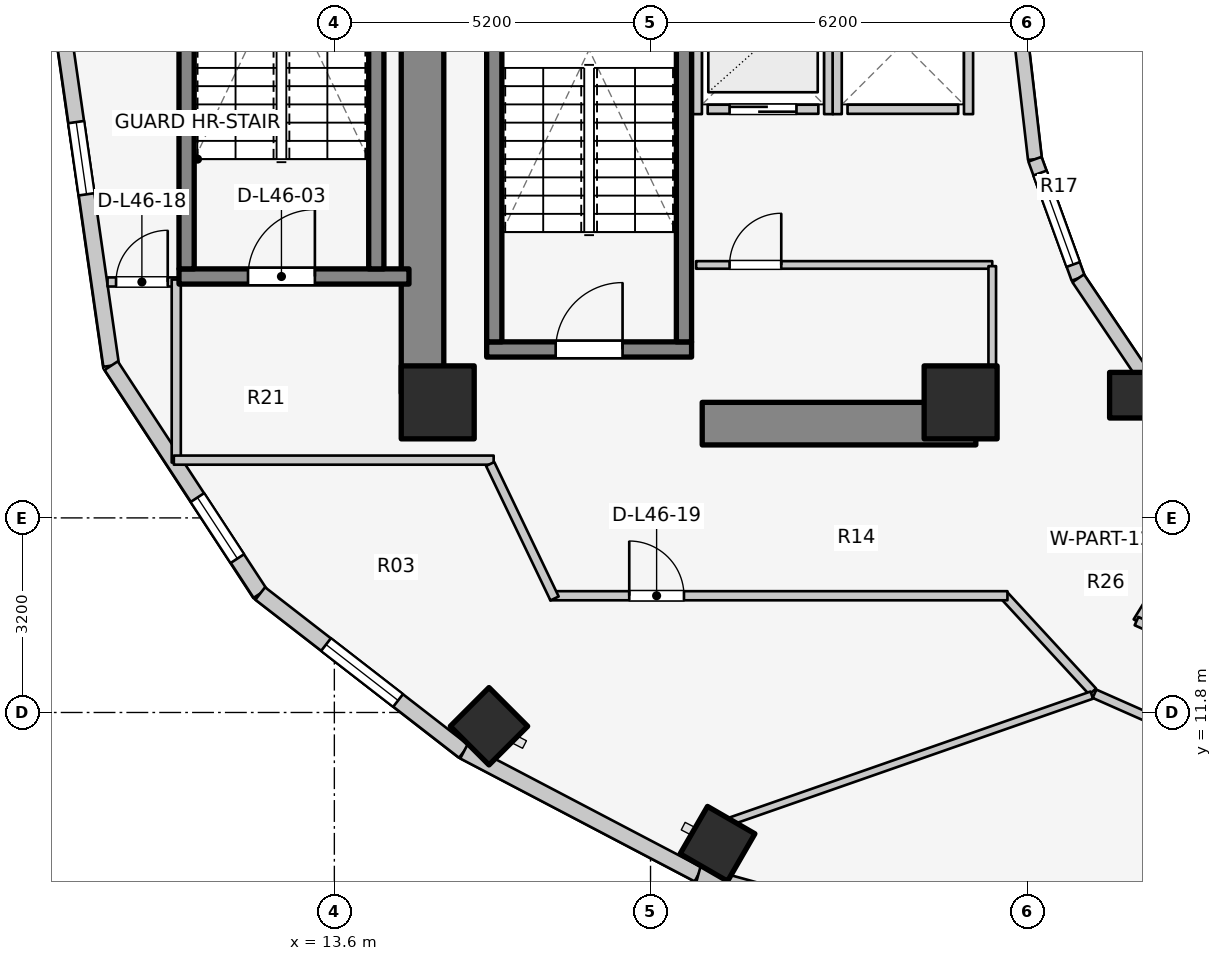
"""IFC4 building model, lengths in metres.
Left out: names, types, materials, properties, quantities, classifications, styles, units other than length and angle.
Written with IfcOpenShell. Run it as: python <this file> out.ifc"""

import sys

from ifc_helpers import new_model, si_unit, direction, frame, frame_2d, origin, origin_2d, place, context, subcontext, project, spatial, rectangle, extrude, element, fill, save


model = new_model("IFC4")
c1 = context("Model", 3, precision=1e-05, world=origin(), true_north=direction((0.0, 1.0)))
c2 = subcontext(c1, "Body", "Model", "MODEL_VIEW")
j1 = project(units=[si_unit("LENGTHUNIT", "METRE"), si_unit("PLANEANGLEUNIT", "RADIAN")], contexts=[c1])
p1 = place(None, origin())
s1 = spatial("IfcSite", under=j1, at=p1, CompositionType="ELEMENT")
p2 = place(p1, origin())
s2 = spatial("IfcBuilding", under=s1, at=p2, CompositionType="ELEMENT")
p3 = place(p2, frame((0.0, 0.0, 152.9)))
s3 = spatial("IfcBuildingStorey", under=s2, at=p3, CompositionType="ELEMENT", Elevation=152.9)
p4 = place(p3, frame((15.05, 17.05, 0.0), z_axis=(0.0, 0.0, 1.0), x_axis=(0.0, 1.0, 0.0)))
e1 = element("IfcWall", 1, at=p4, inside=s3, PredefinedType="SHEAR", context=c2, shape_type="SweptSolid", body=[
    extrude(rectangle(XDim=12.8, YDim=0.7, at=frame_2d((6.4, 0.0))), origin(), (0.0, 0.0, 1.0), 3.1),
])
p5 = place(p3, frame((19.65, 16.55, 0.0), z_axis=(0.0, 0.0, 1.0), x_axis=(1.0, 0.0, 0.0)))
e2 = element("IfcWall", 2, at=p5, inside=s3, PredefinedType="SHEAR", context=c2, shape_type="SweptSolid", body=[
    extrude(rectangle(XDim=4.5, YDim=0.7, at=frame_2d((2.25, 0.0))), origin(), (0.0, 0.0, 1.0), 3.1),
])
p6 = place(p3, frame((16.105, 17.77, 0.0), z_axis=(0.0, 0.0, 1.0), x_axis=(1.0, 0.0, 0.0)))
e3 = element("IfcWall", 3, at=p6, inside=s3, PredefinedType="SOLIDWALL", context=c2, shape_type="SweptSolid", body=[
    extrude(rectangle(XDim=3.37, YDim=0.25, at=frame_2d((1.685, 0.0))), origin(), (0.0, 0.0, 1.0), 3.1),
])
p7 = place(p6, frame((1.135, 0.0, 0.0)))
e4 = element("IfcOpeningElement", 4, at=p7, cuts=e3, PredefinedType="OPENING", context=c2, shape_type="SweptSolid", body=[
    extrude(rectangle(XDim=1.1, YDim=2.1, at=frame_2d((0.55, 1.05))), frame((0.0, 0.135, 0.0), z_axis=(0.0, -1.0, 0.0), x_axis=(1.0, 0.0, 0.0)), (0.0, 0.0, 1.0), 0.27),
])
for number, where, z_axis, x_axis in (
    (5, (16.23, 17.895, 0.0), (0.0, 0.0, 1.0), (0.0, 1.0, 0.0)),
    (6, (19.35, 17.895, 0.0), (0.0, 0.0, 1.0), (0.0, 1.0, 0.0)),
):
    element("IfcWall", number, at=place(p3, frame(where, z_axis=z_axis, x_axis=x_axis)), inside=s3, PredefinedType="SOLIDWALL", context=c2, shape_type="SweptSolid", body=[
        extrude(rectangle(XDim=7.81, YDim=0.25, at=frame_2d((3.905, 0.0))), origin(), (0.0, 0.0, 1.0), 3.1),
    ])
p8 = place(p3, frame((11.045, 18.97, 0.0), z_axis=(0.0, 0.0, 1.0), x_axis=(1.0, 0.0, 0.0)))
e7 = element("IfcWall", 7, at=p8, inside=s3, PredefinedType="SOLIDWALL", context=c2, shape_type="SweptSolid", body=[
    extrude(rectangle(XDim=3.782, YDim=0.25, at=frame_2d((1.891, 0.0))), origin(), (0.0, 0.0, 1.0), 3.1),
])
p9 = place(p8, frame((1.135, 0.0, 0.0)))
e8 = element("IfcOpeningElement", 8, at=p9, cuts=e7, PredefinedType="OPENING", context=c2, shape_type="SweptSolid", body=[
    extrude(rectangle(XDim=1.1, YDim=2.1, at=frame_2d((0.55, 1.05))), frame((0.0, 0.135, 0.0), z_axis=(0.0, -1.0, 0.0), x_axis=(1.0, 0.0, 0.0)), (0.0, 0.0, 1.0), 0.27),
])
for number, where, z_axis, x_axis in (
    (9, (11.17, 19.095, 0.0), (0.0, 0.0, 1.0), (0.0, 1.0, 0.0)),
    (10, (14.29, 19.095, 0.0), (0.0, 0.0, 1.0), (0.0, 1.0, 0.0)),
):
    element("IfcWall", number, at=place(p3, frame(where, z_axis=z_axis, x_axis=x_axis)), inside=s3, PredefinedType="SOLIDWALL", context=c2, shape_type="SweptSolid", body=[
        extrude(rectangle(XDim=7.81, YDim=0.25, at=frame_2d((3.905, 0.0))), origin(), (0.0, 0.0, 1.0), 3.1),
    ])
for number, where, z_axis, x_axis in (
    (11, (15.3, 16.9, 0.0), (0.0, 0.0, 1.0), (1.0, 0.0, 0.0)),
    (12, (23.9, 16.9, 0.0), (0.0, 0.0, 1.0), (1.0, 0.0, 0.0)),
):
    element("IfcColumn", number, at=place(p3, frame(where, z_axis=z_axis, x_axis=x_axis)), inside=s3, PredefinedType="COLUMN", context=c2, shape_type="SweptSolid", body=[
        extrude(rectangle(XDim=1.2, YDim=1.2, at=origin_2d()), origin(), (0.0, 0.0, 1.0), 3.1),
    ])
p10 = place(p3, frame((26.725, 17.018, 0.0), z_axis=(0.0, 0.0, 1.0), x_axis=(1.0, 0.0, 0.0)))
e13 = element("IfcColumn", 13, at=p10, inside=s3, PredefinedType="COLUMN", context=c2, shape_type="SweptSolid", body=[
    extrude(rectangle(XDim=0.75, YDim=0.75, at=origin_2d()), origin(), (0.0, 0.0, 1.0), 3.1),
])
for number, where, z_axis, x_axis in (
    (14, (16.143, 11.573, 0.0), (0.0, 0.0, 1.0), (-0.707, -0.707, 0.0)),
    (15, (19.902, 9.641, 0.0), (0.0, 0.0, 1.0), (-0.5, -0.866, 0.0)),
):
    element("IfcColumn", number, at=place(p3, frame(where, z_axis=z_axis, x_axis=x_axis)), inside=s3, PredefinedType="COLUMN", context=c2, shape_type="SweptSolid", body=[
        extrude(rectangle(XDim=0.9, YDim=0.9, at=origin_2d()), origin(), (0.0, 0.0, 1.0), 3.1),
    ])
p11 = place(p3, frame((24.88, 23.0, 0.0), z_axis=(0.0, 0.0, 1.0), x_axis=(0.114711713601, -0.993398823617, 0.0)))
e16 = element("IfcWall", 16, at=p11, inside=s3, PredefinedType="STANDARD", context=c2, shape_type="SweptSolid", body=[
    extrude(rectangle(XDim=2.115, YDim=0.23, at=frame_2d((1.058, 0.0))), origin(), (0.0, 0.0, 1.0), 2.84),
])
p12 = place(p3, frame((25.123, 20.898, 0.0), z_axis=(0.0, 0.0, 1.0), x_axis=(0.341423187295, -0.93990968033, 0.0)))
e17 = element("IfcWall", 17, at=p12, inside=s3, PredefinedType="STANDARD", context=c2, shape_type="SweptSolid", body=[
    extrude(rectangle(XDim=2.084, YDim=0.23, at=frame_2d((1.042, 0.0))), origin(), (0.0, 0.0, 1.0), 2.84),
])
p13 = place(p12, frame((0.242, 0.0, 0.85)))
e18 = element("IfcOpeningElement", 18, at=p13, cuts=e17, PredefinedType="OPENING", context=c2, shape_type="SweptSolid", body=[
    extrude(rectangle(XDim=1.6, YDim=1.65, at=frame_2d((0.8, 0.825))), frame((0.0, 0.125, 0.0), z_axis=(0.0, -1.0, 0.0), x_axis=(1.0, 0.0, 0.0)), (0.0, 0.0, 1.0), 0.25),
])
p14 = place(p3, frame((25.834, 18.94, 0.0), z_axis=(0.0, 0.0, 1.0), x_axis=(0.558197800898, -0.829707909492, 0.0)))
e19 = element("IfcWall", 19, at=p14, inside=s3, PredefinedType="STANDARD", context=c2, shape_type="SweptSolid", body=[
    extrude(rectangle(XDim=2.027, YDim=0.23, at=frame_2d((1.013, 0.0))), origin(), (0.0, 0.0, 1.0), 2.16),
])
p15 = place(p3, frame((9.14, 23.0, 0.0), z_axis=(0.0, 0.0, 1.0), x_axis=(0.142227632286, -0.989833976288, 0.0)))
e20 = element("IfcWall", 20, at=p15, inside=s3, PredefinedType="STANDARD", context=c2, shape_type="SweptSolid", body=[
    extrude(rectangle(XDim=5.553, YDim=0.26, at=frame_2d((2.776, 0.0))), origin(), (0.0, 0.0, 1.0), 2.85),
])
p16 = place(p15, frame((1.506, 0.0, 0.75)))
e21 = element("IfcOpeningElement", 21, at=p16, cuts=e20, PredefinedType="OPENING", context=c2, shape_type="SweptSolid", body=[
    extrude(rectangle(XDim=1.2, YDim=1.5, at=frame_2d((0.6, 0.75))), frame((0.0, 0.14, 0.0), z_axis=(0.0, -1.0, 0.0), x_axis=(1.0, 0.0, 0.0)), (0.0, 0.0, 1.0), 0.28),
])
p17 = place(p3, frame((9.93, 17.503, 0.0), z_axis=(0.0, 0.0, 1.0), x_axis=(0.547456494366, -0.836834145322, 0.0)))
e22 = element("IfcWall", 22, at=p17, inside=s3, PredefinedType="STANDARD", context=c2, shape_type="SweptSolid", body=[
    extrude(rectangle(XDim=4.477, YDim=0.26, at=frame_2d((2.239, 0.0))), origin(), (0.0, 0.0, 1.0), 2.85),
])
p18 = place(p17, frame((2.591, 0.0, 0.75)))
e23 = element("IfcOpeningElement", 23, at=p18, cuts=e22, PredefinedType="OPENING", context=c2, shape_type="SweptSolid", body=[
    extrude(rectangle(XDim=1.2, YDim=1.5, at=frame_2d((0.6, 0.75))), frame((0.0, 0.14, 0.0), z_axis=(0.0, -1.0, 0.0), x_axis=(1.0, 0.0, 0.0)), (0.0, 0.0, 1.0), 0.28),
])
p19 = place(p3, frame((12.381, 13.757, 0.0), z_axis=(0.0, 0.0, 1.0), x_axis=(0.790185650662, -0.612867552973, 0.0)))
e24 = element("IfcWall", 24, at=p19, inside=s3, PredefinedType="STANDARD", context=c2, shape_type="SweptSolid", body=[
    extrude(rectangle(XDim=4.239, YDim=0.26, at=frame_2d((2.12, 0.0))), origin(), (0.0, 0.0, 1.0), 2.85),
])
p20 = place(p19, frame((1.37, 0.0, 0.75)))
e25 = element("IfcOpeningElement", 25, at=p20, cuts=e24, PredefinedType="OPENING", context=c2, shape_type="SweptSolid", body=[
    extrude(rectangle(XDim=1.5, YDim=1.6, at=frame_2d((0.75, 0.8))), frame((0.0, 0.14, 0.0), z_axis=(0.0, -1.0, 0.0), x_axis=(1.0, 0.0, 0.0)), (0.0, 0.0, 1.0), 0.28),
])
p21 = place(p3, frame((15.731, 11.158, 0.0), z_axis=(0.0, 0.0, 1.0), x_axis=(0.885660265226, -0.464333818065, 0.0)))
e26 = element("IfcWall", 26, at=p21, inside=s3, PredefinedType="STANDARD", context=c2, shape_type="SweptSolid", body=[
    extrude(rectangle(XDim=4.354, YDim=0.26, at=frame_2d((2.177, 0.0))), origin(), (0.0, 0.0, 1.0), 2.85),
])
p22 = place(p3, frame((19.587, 9.137, 0.0), z_axis=(0.0, 0.0, 1.0), x_axis=(0.963953455704, -0.26607092144, 0.0)))
e27 = element("IfcWall", 27, at=p22, inside=s3, PredefinedType="STANDARD", context=c2, shape_type="SweptSolid", body=[
    extrude(rectangle(XDim=5.237, YDim=0.26, at=frame_2d((2.618, 0.0))), origin(), (0.0, 0.0, 1.0), 2.85),
])
p23 = place(p22, frame((1.868, 0.0, 0.75)))
e28 = element("IfcOpeningElement", 28, at=p23, cuts=e27, PredefinedType="OPENING", context=c2, shape_type="SweptSolid", body=[
    extrude(rectangle(XDim=1.5, YDim=1.6, at=frame_2d((0.75, 0.8))), frame((0.0, 0.14, 0.0), z_axis=(0.0, -1.0, 0.0), x_axis=(1.0, 0.0, 0.0)), (0.0, 0.0, 1.0), 0.28),
])
p24 = place(p3, frame((19.74, 21.72, 0.0), z_axis=(0.0, 0.0, 1.0), x_axis=(1.0, 0.0, 0.0)))
e29 = element("IfcWall", 29, at=p24, inside=s3, PredefinedType="SOLIDWALL", context=c2, shape_type="SweptSolid", body=[
    extrude(rectangle(XDim=1.82, YDim=0.15, at=frame_2d((0.91, 0.0))), origin(), (0.0, 0.0, 1.0), 2.855),
])
p25 = place(p24, frame((0.36, 0.0, 0.0)))
e30 = element("IfcOpeningElement", 30, at=p25, cuts=e29, PredefinedType="OPENING", context=c2, shape_type="SweptSolid", body=[
    extrude(rectangle(XDim=1.1, YDim=2.1, at=frame_2d((0.55, 1.05))), frame((0.0, 0.085, 0.0), z_axis=(0.0, -1.0, 0.0), x_axis=(1.0, 0.0, 0.0)), (0.0, 0.0, 1.0), 0.17),
])
for number, where, z_axis, x_axis in (
    (31, (19.57, 21.64, 0.0), (0.0, 0.0, 1.0), (0.0, 1.0, 0.0)),
    (32, (21.73, 21.64, 0.0), (0.0, 0.0, 1.0), (0.0, 1.0, 0.0)),
):
    element("IfcWall", number, at=place(p3, frame(where, z_axis=z_axis, x_axis=x_axis)), inside=s3, PredefinedType="SOLIDWALL", context=c2, shape_type="SweptSolid", body=[
        extrude(rectangle(XDim=2.32, YDim=0.15, at=frame_2d((1.16, 0.0))), origin(), (0.0, 0.0, 1.0), 2.855),
    ])
p26 = place(p3, frame((22.04, 21.72, 0.0), z_axis=(0.0, 0.0, 1.0), x_axis=(1.0, 0.0, 0.0)))
e33 = element("IfcWall", 33, at=p26, inside=s3, PredefinedType="SOLIDWALL", context=c2, shape_type="SweptSolid", body=[
    extrude(rectangle(XDim=1.82, YDim=0.15, at=frame_2d((0.91, 0.0))), origin(), (0.0, 0.0, 1.0), 2.12),
])
p27 = place(p3, frame((21.87, 21.64, 0.0), z_axis=(0.0, 0.0, 1.0), x_axis=(0.0, 1.0, 0.0)))
e34 = element("IfcWall", 34, at=p27, inside=s3, PredefinedType="SOLIDWALL", context=c2, shape_type="SweptSolid", body=[
    extrude(rectangle(XDim=2.32, YDim=0.15, at=frame_2d((1.16, 0.0))), origin(), (0.0, 0.0, 1.0), 2.855),
])
p28 = place(p3, frame((24.03, 21.64, 0.0), z_axis=(0.0, 0.0, 1.0), x_axis=(0.0, 1.0, 0.0)))
e35 = element("IfcWall", 35, at=p28, inside=s3, PredefinedType="SOLIDWALL", context=c2, shape_type="SweptSolid", body=[
    extrude(rectangle(XDim=2.32, YDim=0.15, at=frame_2d((1.16, 0.0))), origin(), (0.0, 0.0, 1.0), 2.12),
])
p29 = place(p3, frame((19.55, 19.16, 0.0), z_axis=(0.0, 0.0, 1.0), x_axis=(1.0, 0.0, 0.0)))
e36 = element("IfcWall", 36, at=p29, inside=s3, PredefinedType="PARTITIONING", context=c2, shape_type="SweptSolid", body=[
    extrude(rectangle(XDim=4.87, YDim=0.125, at=frame_2d((2.435, 0.0))), origin(), (0.0, 0.0, 1.0), 2.12),
])
p30 = place(p29, frame((0.55, 0.0, 0.0)))
e37 = element("IfcOpeningElement", 37, at=p30, cuts=e36, PredefinedType="OPENING", context=c2, shape_type="SweptSolid", body=[
    extrude(rectangle(XDim=0.85, YDim=2.05, at=frame_2d((0.425, 1.025))), frame((0.0, 0.073, 0.0), z_axis=(0.0, -1.0, 0.0), x_axis=(1.0, 0.0, 0.0)), (0.0, 0.0, 1.0), 0.145),
])
p31 = place(p3, frame((24.42, 17.1, 0.0), z_axis=(0.0, 0.0, 1.0), x_axis=(0.0, 1.0, 0.0)))
e38 = element("IfcWall", 38, at=p31, inside=s3, PredefinedType="PARTITIONING", context=c2, shape_type="SweptSolid", body=[
    extrude(rectangle(XDim=2.04, YDim=0.125, at=frame_2d((1.02, 0.0))), origin(), (0.0, 0.0, 1.0), 2.232),
])
p32 = place(p3, frame((9.87, 18.88, 0.0), z_axis=(0.0, 0.0, 1.0), x_axis=(1.0, 0.0, 0.0)))
e39 = element("IfcWall", 39, at=p32, inside=s3, PredefinedType="PARTITIONING", context=c2, shape_type="SweptSolid", body=[
    extrude(rectangle(XDim=1.17, YDim=0.15, at=frame_2d((0.585, 0.0))), origin(), (0.0, 0.0, 1.0), 2.855),
])
p33 = place(p32, frame((0.14, 0.0, 0.0)))
e40 = element("IfcOpeningElement", 40, at=p33, cuts=e39, PredefinedType="OPENING", context=c2, shape_type="SweptSolid", body=[
    extrude(rectangle(XDim=0.85, YDim=2.05, at=frame_2d((0.425, 1.025))), frame((0.0, 0.085, 0.0), z_axis=(0.0, -1.0, 0.0), x_axis=(1.0, 0.0, 0.0)), (0.0, 0.0, 1.0), 0.17),
])
p34 = place(p3, frame((11.0, 15.91, 0.0), z_axis=(0.0, 0.0, 1.0), x_axis=(0.0, 1.0, 0.0)))
e41 = element("IfcWall", 41, at=p34, inside=s3, PredefinedType="PARTITIONING", context=c2, shape_type="SweptSolid", body=[
    extrude(rectangle(XDim=3.01, YDim=0.15, at=frame_2d((1.505, 0.0))), origin(), (0.0, 0.0, 1.0), 2.855),
])
p35 = place(p3, frame((10.96, 15.95, 0.0), z_axis=(0.0, 0.0, 1.0), x_axis=(1.0, 0.0, 0.0)))
e42 = element("IfcWall", 42, at=p35, inside=s3, PredefinedType="PARTITIONING", context=c2, shape_type="SweptSolid", body=[
    extrude(rectangle(XDim=5.26, YDim=0.15, at=frame_2d((2.63, 0.0))), origin(), (0.0, 0.0, 1.0), 2.22),
])
p36 = place(p3, frame((26.072, 12.144, 0.0), z_axis=(0.0, 0.0, 1.0), x_axis=(-0.677579737957, 0.735449317567, 0.0)))
e43 = element("IfcWall", 43, at=p36, inside=s3, PredefinedType="PARTITIONING", context=c2, shape_type="SweptSolid", body=[
    extrude(rectangle(XDim=2.173, YDim=0.15, at=frame_2d((1.086, 0.0))), origin(), (0.0, 0.0, 1.0), 2.299),
])
p37 = place(p3, frame((17.15, 13.72, 0.0), z_axis=(0.0, 0.0, 1.0), x_axis=(1.0, 0.0, 0.0)))
e44 = element("IfcWall", 44, at=p37, inside=s3, PredefinedType="PARTITIONING", context=c2, shape_type="SweptSolid", body=[
    extrude(rectangle(XDim=7.52, YDim=0.15, at=frame_2d((3.76, 0.0))), origin(), (0.0, 0.0, 1.0), 2.299),
])
p38 = place(p37, frame((1.3, 0.0, 0.0)))
e45 = element("IfcOpeningElement", 45, at=p38, cuts=e44, PredefinedType="OPENING", context=c2, shape_type="SweptSolid", body=[
    extrude(rectangle(XDim=0.9, YDim=2.1, at=frame_2d((0.45, 1.05))), frame((0.0, 0.085, 0.0), z_axis=(0.0, -1.0, 0.0), x_axis=(1.0, 0.0, 0.0)), (0.0, 0.0, 1.0), 0.17),
])
p39 = place(p3, frame((17.222, 13.675, 0.0), z_axis=(0.0, 0.0, 1.0), x_axis=(-0.431973389813, 0.901886351207, 0.0)))
e46 = element("IfcWall", 46, at=p39, inside=s3, PredefinedType="PARTITIONING", context=c2, shape_type="SweptSolid", body=[
    extrude(rectangle(XDim=2.452, YDim=0.15, at=frame_2d((1.226, 0.0))), origin(), (0.0, 0.0, 1.0), 2.855),
])
p40 = place(p3, frame((28.45, 15.985, 0.0), z_axis=(0.0, 0.0, 1.0), x_axis=(-0.523587550846, -0.851971875474, 0.0)))
e47 = element("IfcWall", 47, at=p40, inside=s3, PredefinedType="PARTITIONING", context=c2, shape_type="SweptSolid", body=[
    extrude(rectangle(XDim=3.153, YDim=0.125, at=frame_2d((1.577, 0.0))), origin(), (0.0, 0.0, 1.0), 2.299),
])
p41 = place(p3, frame((26.793, 13.303, 0.0), z_axis=(0.0, 0.0, 1.0), x_axis=(0.913145536541, -0.407633694749, 0.0)))
e48 = element("IfcWall", 48, at=p41, inside=s3, PredefinedType="PARTITIONING", context=c2, shape_type="SweptSolid", body=[
    extrude(rectangle(XDim=2.756, YDim=0.15, at=frame_2d((1.378, 0.0))), origin(), (0.0, 0.0, 1.0), 2.299),
])
p42 = place(p3, frame((26.057, 12.086, 0.0), z_axis=(0.0, 0.0, 1.0), x_axis=(-0.944182779284, -0.329422038278, 0.0)))
e49 = element("IfcWall", 49, at=p42, inside=s3, PredefinedType="PARTITIONING", context=c2, shape_type="SweptSolid", body=[
    extrude(rectangle(XDim=6.291, YDim=0.125, at=frame_2d((3.146, 0.0))), origin(), (0.0, 0.0, 1.0), 2.299),
])
p43 = place(p3, frame((26.102, 12.108, 0.0), z_axis=(0.0, 0.0, 1.0), x_axis=(0.914519212393, -0.40454247016, 0.0)))
e50 = element("IfcWall", 50, at=p43, inside=s3, PredefinedType="PARTITIONING", context=c2, shape_type="SweptSolid", body=[
    extrude(rectangle(XDim=3.124, YDim=0.15, at=frame_2d((1.562, 0.0))), origin(), (0.0, 0.0, 1.0), 2.299),
])
p44 = place(p13, origin())
e51 = element("IfcWindow", 51, at=p44, inside=s3, PartitioningType="SINGLE_PANEL", PredefinedType="WINDOW", context=c2, shape_type="SweptSolid", body=[
    extrude(rectangle(XDim=1.6, YDim=1.65, at=frame_2d((0.8, 0.825))), frame((0.0, 0.03, 0.0), z_axis=(0.0, -1.0, 0.0), x_axis=(1.0, 0.0, 0.0)), (0.0, 0.0, 1.0), 0.06),
])
fill(e18, e51)
p45 = place(p16, origin())
e52 = element("IfcWindow", 52, at=p45, inside=s3, PartitioningType="SINGLE_PANEL", PredefinedType="WINDOW", context=c2, shape_type="SweptSolid", body=[
    extrude(rectangle(XDim=1.2, YDim=1.5, at=frame_2d((0.6, 0.75))), frame((0.0, 0.03, 0.0), z_axis=(0.0, -1.0, 0.0), x_axis=(1.0, 0.0, 0.0)), (0.0, 0.0, 1.0), 0.06),
])
fill(e21, e52)
p46 = place(p18, origin())
e53 = element("IfcWindow", 53, at=p46, inside=s3, PartitioningType="SINGLE_PANEL", PredefinedType="WINDOW", context=c2, shape_type="SweptSolid", body=[
    extrude(rectangle(XDim=1.2, YDim=1.5, at=frame_2d((0.6, 0.75))), frame((0.0, 0.03, 0.0), z_axis=(0.0, -1.0, 0.0), x_axis=(1.0, 0.0, 0.0)), (0.0, 0.0, 1.0), 0.06),
])
fill(e23, e53)
p47 = place(p20, origin())
e54 = element("IfcWindow", 54, at=p47, inside=s3, PartitioningType="SINGLE_PANEL", PredefinedType="WINDOW", context=c2, shape_type="SweptSolid", body=[
    extrude(rectangle(XDim=1.5, YDim=1.6, at=frame_2d((0.75, 0.8))), frame((0.0, 0.03, 0.0), z_axis=(0.0, -1.0, 0.0), x_axis=(1.0, 0.0, 0.0)), (0.0, 0.0, 1.0), 0.06),
])
fill(e25, e54)
p48 = place(p7, origin())
e55 = element("IfcDoor", 55, at=p48, inside=s3, OperationType="SINGLE_SWING_RIGHT", PredefinedType="DOOR", context=c2, shape_type="SweptSolid", body=[
    extrude(rectangle(XDim=1.1, YDim=2.1, at=frame_2d((0.55, 1.05))), frame((0.0, 0.025, 0.0), z_axis=(0.0, -1.0, 0.0), x_axis=(1.0, 0.0, 0.0)), (0.0, 0.0, 1.0), 0.05),
])
fill(e4, e55)
p49 = place(p9, origin())
e56 = element("IfcDoor", 56, at=p49, inside=s3, OperationType="SINGLE_SWING_RIGHT", PredefinedType="DOOR", context=c2, shape_type="SweptSolid", body=[
    extrude(rectangle(XDim=1.1, YDim=2.1, at=frame_2d((0.55, 1.05))), frame((0.0, 0.025, 0.0), z_axis=(0.0, -1.0, 0.0), x_axis=(1.0, 0.0, 0.0)), (0.0, 0.0, 1.0), 0.05),
])
fill(e8, e56)
p50 = place(p25, origin())
e57 = element("IfcDoor", 57, at=p50, inside=s3, OperationType="DOUBLE_DOOR_SLIDING", PredefinedType="DOOR", context=c2, shape_type="SweptSolid", body=[
    extrude(rectangle(XDim=1.1, YDim=2.1, at=frame_2d((0.55, 1.05))), frame((0.0, 0.025, 0.0), z_axis=(0.0, -1.0, 0.0), x_axis=(1.0, 0.0, 0.0)), (0.0, 0.0, 1.0), 0.05),
])
fill(e30, e57)
p51 = place(p30, origin())
e58 = element("IfcDoor", 58, at=p51, inside=s3, OperationType="SINGLE_SWING_RIGHT", PredefinedType="DOOR", context=c2, shape_type="SweptSolid", body=[
    extrude(rectangle(XDim=0.85, YDim=2.05, at=frame_2d((0.425, 1.025))), frame((0.0, 0.025, 0.0), z_axis=(0.0, -1.0, 0.0), x_axis=(1.0, 0.0, 0.0)), (0.0, 0.0, 1.0), 0.05),
])
fill(e37, e58)
p52 = place(p33, origin())
e59 = element("IfcDoor", 59, at=p52, inside=s3, OperationType="SINGLE_SWING_RIGHT", PredefinedType="DOOR", context=c2, shape_type="SweptSolid", body=[
    extrude(rectangle(XDim=0.85, YDim=2.05, at=frame_2d((0.425, 1.025))), frame((0.0, 0.025, 0.0), z_axis=(0.0, -1.0, 0.0), x_axis=(1.0, 0.0, 0.0)), (0.0, 0.0, 1.0), 0.05),
])
fill(e40, e59)
p53 = place(p38, origin())
e60 = element("IfcDoor", 60, at=p53, inside=s3, OperationType="SINGLE_SWING_LEFT", PredefinedType="DOOR", context=c2, shape_type="SweptSolid", body=[
    extrude(rectangle(XDim=0.9, YDim=2.1, at=frame_2d((0.45, 1.05))), frame((0.0, 0.025, 0.0), z_axis=(0.0, -1.0, 0.0), x_axis=(1.0, 0.0, 0.0)), (0.0, 0.0, 1.0), 0.05),
])
fill(e45, e60)
save(model, sys.argv[1])
